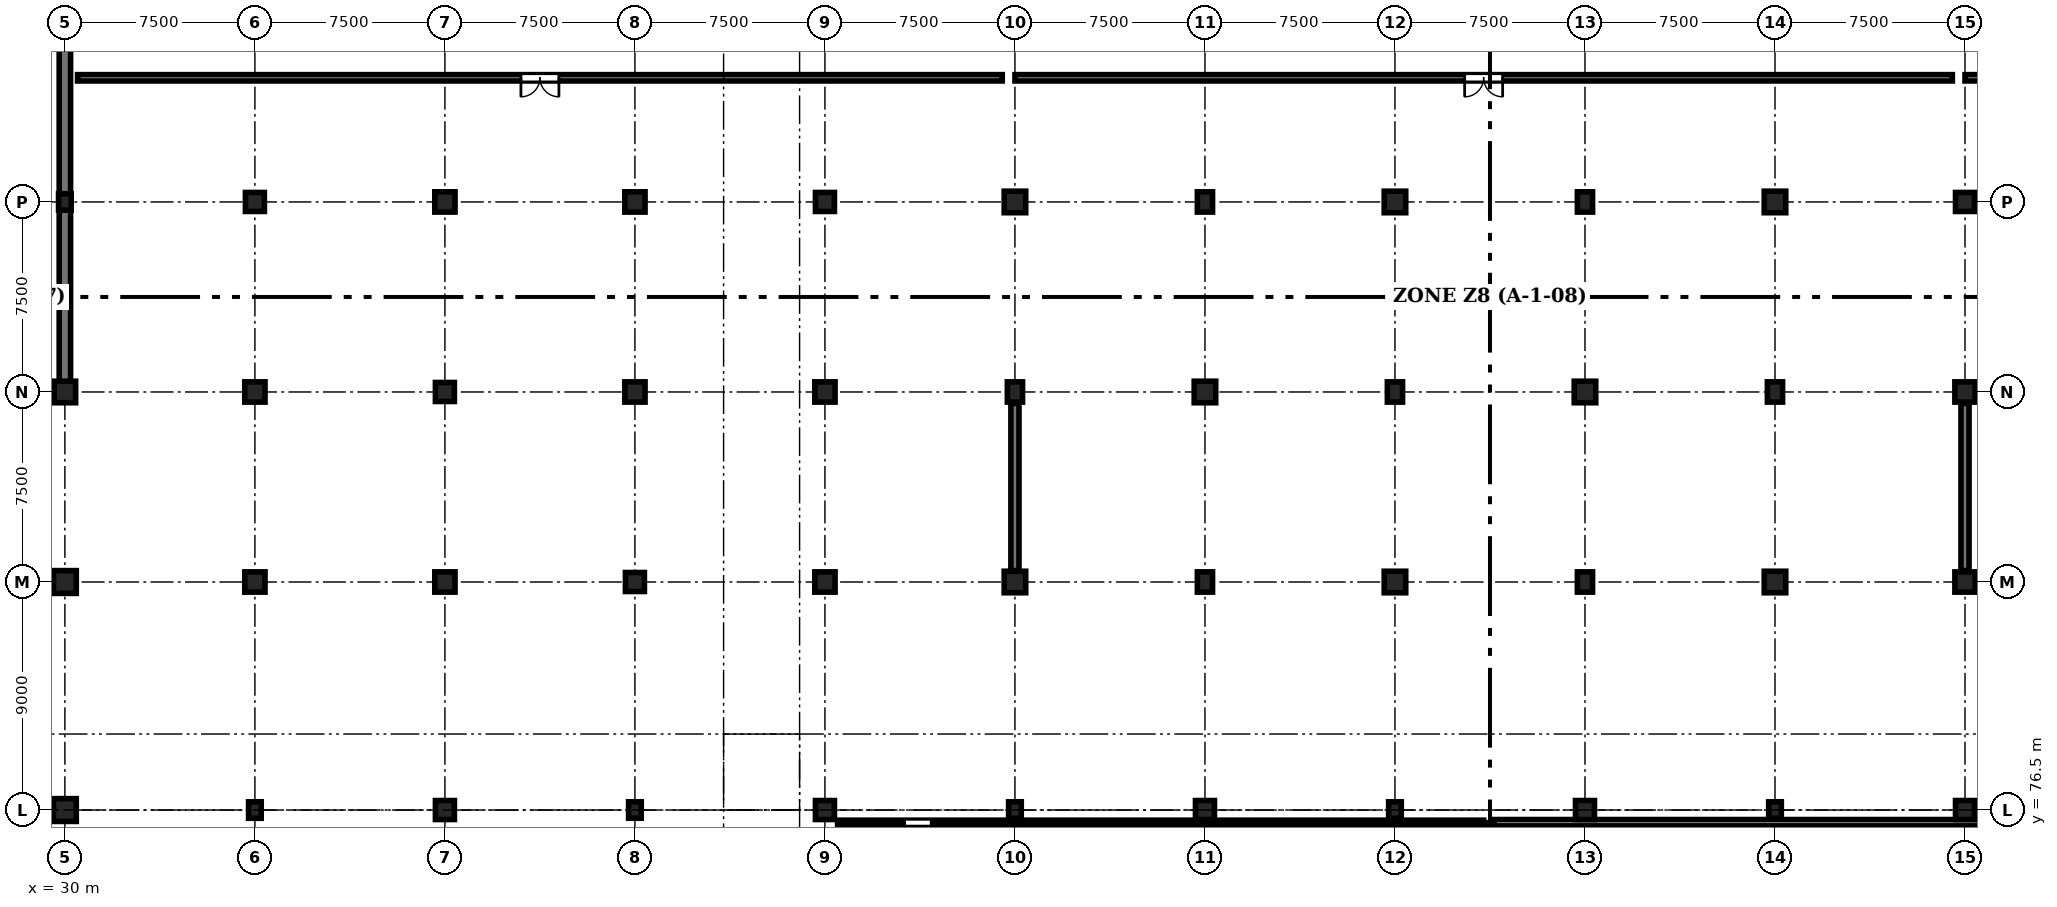
"""IFC4 building model, lengths in metres.
Left out: names, types, materials, properties, quantities, classifications, styles, units other than length and angle.
Written with IfcOpenShell. Run it as: python <this file> out.ifc"""

import sys

from ifc_helpers import new_model, si_unit, direction, frame, frame_2d, origin, origin_2d, place, context, subcontext, project, spatial, rectangle, circle, extrude, element, fill, save


model = new_model("IFC4")
c1 = context("Model", 3, precision=1e-05, world=origin(), true_north=direction((0.0, 1.0)))
c2 = subcontext(c1, "Body", "Model", "MODEL_VIEW")
j1 = project(units=[si_unit("LENGTHUNIT", "METRE"), si_unit("PLANEANGLEUNIT", "RADIAN")], contexts=[c1])
p1 = place(None, origin())
s1 = spatial("IfcSite", under=j1, at=p1, CompositionType="ELEMENT")
p2 = place(p1, origin())
s2 = spatial("IfcBuilding", under=s1, at=p2, CompositionType="ELEMENT")
p3 = place(p2, frame((0.0, 0.0, -4.5)))
s3 = spatial("IfcBuildingStorey", under=s2, at=p3, CompositionType="ELEMENT", Elevation=-4.5)
p4 = place(p3, frame((30.0, 76.5, 0.0), z_axis=(0.0, 0.0, 1.0), x_axis=(1.0, 0.0, 0.0)))
e1 = element("IfcColumn", 1, at=p4, inside=s3, PredefinedType="COLUMN", context=c2, shape_type="SweptSolid", body=[
    extrude(rectangle(XDim=0.9, YDim=0.9, at=origin_2d()), origin(), (0.0, 0.0, 1.0), 4.5),
])
p5 = place(p3, frame((30.0, 85.5, 0.0), z_axis=(0.0, 0.0, 1.0), x_axis=(1.0, 0.0, 0.0)))
e2 = element("IfcColumn", 2, at=p5, inside=s3, PredefinedType="COLUMN", context=c2, shape_type="SweptSolid", body=[
    extrude(circle(Radius=0.45, at=origin_2d()), origin(), (0.0, 0.0, 1.0), 4.5),
])
p6 = place(p3, frame((30.0, 93.0, 0.0), z_axis=(0.0, 0.0, 1.0), x_axis=(1.0, 0.0, 0.0)))
e3 = element("IfcColumn", 3, at=p6, inside=s3, PredefinedType="COLUMN", context=c2, shape_type="SweptSolid", body=[
    extrude(rectangle(XDim=0.85, YDim=0.85, at=origin_2d()), origin(), (0.0, 0.0, 1.0), 4.5),
])
for number, where, z_axis, x_axis in (
    (4, (30.0, 100.5, 0.0), (0.0, 0.0, 1.0), (1.0, 0.0, 0.0)),
    (5, (37.5, 76.5, 0.0), (0.0, 0.0, 1.0), (1.0, 0.0, 0.0)),
):
    element("IfcColumn", number, at=place(p3, frame(where, z_axis=z_axis, x_axis=x_axis)), inside=s3, PredefinedType="COLUMN", context=c2, shape_type="SweptSolid", body=[
        extrude(rectangle(XDim=0.5, YDim=0.65, at=origin_2d()), origin(), (0.0, 0.0, 1.0), 4.5),
    ])
for number, where, z_axis, x_axis in (
    (6, (37.5, 85.5, 0.0), (0.0, 0.0, 1.0), (1.0, 0.0, 0.0)),
    (7, (37.5, 93.0, 0.0), (0.0, 0.0, 1.0), (1.0, 0.0, 0.0)),
):
    element("IfcColumn", number, at=place(p3, frame(where, z_axis=z_axis, x_axis=x_axis)), inside=s3, PredefinedType="COLUMN", context=c2, shape_type="SweptSolid", body=[
        extrude(rectangle(XDim=0.8, YDim=0.8, at=origin_2d()), origin(), (0.0, 0.0, 1.0), 4.5),
    ])
p7 = place(p3, frame((37.5, 100.5, 0.0), z_axis=(0.0, 0.0, 1.0), x_axis=(1.0, 0.0, 0.0)))
e8 = element("IfcColumn", 8, at=p7, inside=s3, PredefinedType="COLUMN", context=c2, shape_type="SweptSolid", body=[
    extrude(circle(Radius=0.375, at=origin_2d()), origin(), (0.0, 0.0, 1.0), 4.5),
])
p8 = place(p3, frame((45.0, 76.5, 0.0), z_axis=(0.0, 0.0, 1.0), x_axis=(1.0, 0.0, 0.0)))
e9 = element("IfcColumn", 9, at=p8, inside=s3, PredefinedType="COLUMN", context=c2, shape_type="SweptSolid", body=[
    extrude(rectangle(XDim=0.75, YDim=0.75, at=origin_2d()), origin(), (0.0, 0.0, 1.0), 4.5),
])
p9 = place(p3, frame((45.0, 85.5, 0.0), z_axis=(0.0, 0.0, 1.0), x_axis=(1.0, 0.0, 0.0)))
e10 = element("IfcColumn", 10, at=p9, inside=s3, PredefinedType="COLUMN", context=c2, shape_type="SweptSolid", body=[
    extrude(rectangle(XDim=0.8, YDim=0.8, at=origin_2d()), origin(), (0.0, 0.0, 1.0), 4.5),
])
p10 = place(p3, frame((45.0, 93.0, 0.0), z_axis=(0.0, 0.0, 1.0), x_axis=(1.0, 0.0, 0.0)))
e11 = element("IfcColumn", 11, at=p10, inside=s3, PredefinedType="COLUMN", context=c2, shape_type="SweptSolid", body=[
    extrude(circle(Radius=0.375, at=origin_2d()), origin(), (0.0, 0.0, 1.0), 4.5),
])
p11 = place(p3, frame((45.0, 100.5, 0.0), z_axis=(0.0, 0.0, 1.0), x_axis=(1.0, 0.0, 0.0)))
e12 = element("IfcColumn", 12, at=p11, inside=s3, PredefinedType="COLUMN", context=c2, shape_type="SweptSolid", body=[
    extrude(rectangle(XDim=0.8, YDim=0.8, at=origin_2d()), origin(), (0.0, 0.0, 1.0), 4.5),
])
p12 = place(p3, frame((52.5, 76.5, 0.0), z_axis=(0.0, 0.0, 1.0), x_axis=(1.0, 0.0, 0.0)))
e13 = element("IfcColumn", 13, at=p12, inside=s3, PredefinedType="COLUMN", context=c2, shape_type="SweptSolid", body=[
    extrude(rectangle(XDim=0.5, YDim=0.65, at=origin_2d()), origin(), (0.0, 0.0, 1.0), 4.5),
])
p13 = place(p3, frame((52.5, 85.5, 0.0), z_axis=(0.0, 0.0, 1.0), x_axis=(1.0, 0.0, 0.0)))
e14 = element("IfcColumn", 14, at=p13, inside=s3, PredefinedType="COLUMN", context=c2, shape_type="SweptSolid", body=[
    extrude(circle(Radius=0.375, at=origin_2d()), origin(), (0.0, 0.0, 1.0), 4.5),
])
for number, where, z_axis, x_axis in (
    (15, (52.5, 93.0, 0.0), (0.0, 0.0, 1.0), (1.0, 0.0, 0.0)),
    (16, (52.5, 100.5, 0.0), (0.0, 0.0, 1.0), (1.0, 0.0, 0.0)),
):
    element("IfcColumn", number, at=place(p3, frame(where, z_axis=z_axis, x_axis=x_axis)), inside=s3, PredefinedType="COLUMN", context=c2, shape_type="SweptSolid", body=[
        extrude(rectangle(XDim=0.8, YDim=0.8, at=origin_2d()), origin(), (0.0, 0.0, 1.0), 4.5),
    ])
p14 = place(p3, frame((60.0, 76.5, 0.0), z_axis=(0.0, 0.0, 1.0), x_axis=(1.0, 0.0, 0.0)))
e17 = element("IfcColumn", 17, at=p14, inside=s3, PredefinedType="COLUMN", context=c2, shape_type="SweptSolid", body=[
    extrude(rectangle(XDim=0.75, YDim=0.75, at=origin_2d()), origin(), (0.0, 0.0, 1.0), 4.5),
])
for number, where, z_axis, x_axis in (
    (18, (60.0, 85.5, 0.0), (0.0, 0.0, 1.0), (1.0, 0.0, 0.0)),
    (19, (60.0, 93.0, 0.0), (0.0, 0.0, 1.0), (1.0, 0.0, 0.0)),
):
    element("IfcColumn", number, at=place(p3, frame(where, z_axis=z_axis, x_axis=x_axis)), inside=s3, PredefinedType="COLUMN", context=c2, shape_type="SweptSolid", body=[
        extrude(rectangle(XDim=0.8, YDim=0.8, at=origin_2d()), origin(), (0.0, 0.0, 1.0), 4.5),
    ])
p15 = place(p3, frame((60.0, 100.5, 0.0), z_axis=(0.0, 0.0, 1.0), x_axis=(1.0, 0.0, 0.0)))
e20 = element("IfcColumn", 20, at=p15, inside=s3, PredefinedType="COLUMN", context=c2, shape_type="SweptSolid", body=[
    extrude(circle(Radius=0.375, at=origin_2d()), origin(), (0.0, 0.0, 1.0), 4.5),
])
p16 = place(p3, frame((67.5, 76.5, 0.0), z_axis=(0.0, 0.0, 1.0), x_axis=(1.0, 0.0, 0.0)))
e21 = element("IfcColumn", 21, at=p16, inside=s3, PredefinedType="COLUMN", context=c2, shape_type="SweptSolid", body=[
    extrude(rectangle(XDim=0.5, YDim=0.65, at=origin_2d()), origin(), (0.0, 0.0, 1.0), 4.5),
])
p17 = place(p3, frame((67.5, 85.5, 0.0), z_axis=(0.0, 0.0, 1.0), x_axis=(1.0, 0.0, 0.0)))
e22 = element("IfcColumn", 22, at=p17, inside=s3, PredefinedType="COLUMN", context=c2, shape_type="SweptSolid", body=[
    extrude(rectangle(XDim=0.85, YDim=0.85, at=origin_2d()), origin(), (0.0, 0.0, 1.0), 4.5),
])
p18 = place(p3, frame((67.5, 93.0, 0.0), z_axis=(0.0, 0.0, 1.0), x_axis=(1.0, 0.0, 0.0)))
e23 = element("IfcColumn", 23, at=p18, inside=s3, PredefinedType="COLUMN", context=c2, shape_type="SweptSolid", body=[
    extrude(rectangle(XDim=0.6, YDim=0.8, at=origin_2d()), origin(), (0.0, 0.0, 1.0), 4.5),
])
p19 = place(p3, frame((67.5, 100.5, 0.0), z_axis=(0.0, 0.0, 1.0), x_axis=(1.0, 0.0, 0.0)))
e24 = element("IfcColumn", 24, at=p19, inside=s3, PredefinedType="COLUMN", context=c2, shape_type="SweptSolid", body=[
    extrude(rectangle(XDim=0.85, YDim=0.85, at=origin_2d()), origin(), (0.0, 0.0, 1.0), 4.5),
])
p20 = place(p3, frame((75.0, 76.5, 0.0), z_axis=(0.0, 0.0, 1.0), x_axis=(1.0, 0.0, 0.0)))
e25 = element("IfcColumn", 25, at=p20, inside=s3, PredefinedType="COLUMN", context=c2, shape_type="SweptSolid", body=[
    extrude(rectangle(XDim=0.75, YDim=0.75, at=origin_2d()), origin(), (0.0, 0.0, 1.0), 4.5),
])
p21 = place(p3, frame((75.0, 85.5, 0.0), z_axis=(0.0, 0.0, 1.0), x_axis=(1.0, 0.0, 0.0)))
e26 = element("IfcColumn", 26, at=p21, inside=s3, PredefinedType="COLUMN", context=c2, shape_type="SweptSolid", body=[
    extrude(rectangle(XDim=0.6, YDim=0.8, at=origin_2d()), origin(), (0.0, 0.0, 1.0), 4.5),
])
p22 = place(p3, frame((75.0, 93.0, 0.0), z_axis=(0.0, 0.0, 1.0), x_axis=(1.0, 0.0, 0.0)))
e27 = element("IfcColumn", 27, at=p22, inside=s3, PredefinedType="COLUMN", context=c2, shape_type="SweptSolid", body=[
    extrude(rectangle(XDim=0.85, YDim=0.85, at=origin_2d()), origin(), (0.0, 0.0, 1.0), 4.5),
])
p23 = place(p3, frame((75.0, 100.5, 0.0), z_axis=(0.0, 0.0, 1.0), x_axis=(1.0, 0.0, 0.0)))
e28 = element("IfcColumn", 28, at=p23, inside=s3, PredefinedType="COLUMN", context=c2, shape_type="SweptSolid", body=[
    extrude(rectangle(XDim=0.6, YDim=0.8, at=origin_2d()), origin(), (0.0, 0.0, 1.0), 4.5),
])
p24 = place(p3, frame((82.5, 76.5, 0.0), z_axis=(0.0, 0.0, 1.0), x_axis=(1.0, 0.0, 0.0)))
e29 = element("IfcColumn", 29, at=p24, inside=s3, PredefinedType="COLUMN", context=c2, shape_type="SweptSolid", body=[
    extrude(rectangle(XDim=0.5, YDim=0.65, at=origin_2d()), origin(), (0.0, 0.0, 1.0), 4.5),
])
p25 = place(p3, frame((82.5, 85.5, 0.0), z_axis=(0.0, 0.0, 1.0), x_axis=(1.0, 0.0, 0.0)))
e30 = element("IfcColumn", 30, at=p25, inside=s3, PredefinedType="COLUMN", context=c2, shape_type="SweptSolid", body=[
    extrude(rectangle(XDim=0.85, YDim=0.85, at=origin_2d()), origin(), (0.0, 0.0, 1.0), 4.5),
])
p26 = place(p3, frame((82.5, 93.0, 0.0), z_axis=(0.0, 0.0, 1.0), x_axis=(1.0, 0.0, 0.0)))
e31 = element("IfcColumn", 31, at=p26, inside=s3, PredefinedType="COLUMN", context=c2, shape_type="SweptSolid", body=[
    extrude(rectangle(XDim=0.6, YDim=0.8, at=origin_2d()), origin(), (0.0, 0.0, 1.0), 4.5),
])
p27 = place(p3, frame((82.5, 100.5, 0.0), z_axis=(0.0, 0.0, 1.0), x_axis=(1.0, 0.0, 0.0)))
e32 = element("IfcColumn", 32, at=p27, inside=s3, PredefinedType="COLUMN", context=c2, shape_type="SweptSolid", body=[
    extrude(rectangle(XDim=0.85, YDim=0.85, at=origin_2d()), origin(), (0.0, 0.0, 1.0), 4.5),
])
p28 = place(p3, frame((90.0, 76.5, 0.0), z_axis=(0.0, 0.0, 1.0), x_axis=(1.0, 0.0, 0.0)))
e33 = element("IfcColumn", 33, at=p28, inside=s3, PredefinedType="COLUMN", context=c2, shape_type="SweptSolid", body=[
    extrude(rectangle(XDim=0.75, YDim=0.75, at=origin_2d()), origin(), (0.0, 0.0, 1.0), 4.5),
])
p29 = place(p3, frame((90.0, 85.5, 0.0), z_axis=(0.0, 0.0, 1.0), x_axis=(1.0, 0.0, 0.0)))
e34 = element("IfcColumn", 34, at=p29, inside=s3, PredefinedType="COLUMN", context=c2, shape_type="SweptSolid", body=[
    extrude(rectangle(XDim=0.6, YDim=0.8, at=origin_2d()), origin(), (0.0, 0.0, 1.0), 4.5),
])
p30 = place(p3, frame((90.0, 93.0, 0.0), z_axis=(0.0, 0.0, 1.0), x_axis=(1.0, 0.0, 0.0)))
e35 = element("IfcColumn", 35, at=p30, inside=s3, PredefinedType="COLUMN", context=c2, shape_type="SweptSolid", body=[
    extrude(rectangle(XDim=0.85, YDim=0.85, at=origin_2d()), origin(), (0.0, 0.0, 1.0), 4.5),
])
p31 = place(p3, frame((90.0, 100.5, 0.0), z_axis=(0.0, 0.0, 1.0), x_axis=(1.0, 0.0, 0.0)))
e36 = element("IfcColumn", 36, at=p31, inside=s3, PredefinedType="COLUMN", context=c2, shape_type="SweptSolid", body=[
    extrude(rectangle(XDim=0.6, YDim=0.8, at=origin_2d()), origin(), (0.0, 0.0, 1.0), 4.5),
])
p32 = place(p3, frame((97.5, 76.5, 0.0), z_axis=(0.0, 0.0, 1.0), x_axis=(1.0, 0.0, 0.0)))
e37 = element("IfcColumn", 37, at=p32, inside=s3, PredefinedType="COLUMN", context=c2, shape_type="SweptSolid", body=[
    extrude(rectangle(XDim=0.5, YDim=0.65, at=origin_2d()), origin(), (0.0, 0.0, 1.0), 4.5),
])
p33 = place(p3, frame((97.5, 85.5, 0.0), z_axis=(0.0, 0.0, 1.0), x_axis=(1.0, 0.0, 0.0)))
e38 = element("IfcColumn", 38, at=p33, inside=s3, PredefinedType="COLUMN", context=c2, shape_type="SweptSolid", body=[
    extrude(rectangle(XDim=0.85, YDim=0.85, at=origin_2d()), origin(), (0.0, 0.0, 1.0), 4.5),
])
p34 = place(p3, frame((97.5, 93.0, 0.0), z_axis=(0.0, 0.0, 1.0), x_axis=(1.0, 0.0, 0.0)))
e39 = element("IfcColumn", 39, at=p34, inside=s3, PredefinedType="COLUMN", context=c2, shape_type="SweptSolid", body=[
    extrude(rectangle(XDim=0.6, YDim=0.8, at=origin_2d()), origin(), (0.0, 0.0, 1.0), 4.5),
])
p35 = place(p3, frame((97.5, 100.5, 0.0), z_axis=(0.0, 0.0, 1.0), x_axis=(1.0, 0.0, 0.0)))
e40 = element("IfcColumn", 40, at=p35, inside=s3, PredefinedType="COLUMN", context=c2, shape_type="SweptSolid", body=[
    extrude(rectangle(XDim=0.85, YDim=0.85, at=origin_2d()), origin(), (0.0, 0.0, 1.0), 4.5),
])
p36 = place(p3, frame((105.0, 76.5, 0.0), z_axis=(0.0, 0.0, 1.0), x_axis=(1.0, 0.0, 0.0)))
e41 = element("IfcColumn", 41, at=p36, inside=s3, PredefinedType="COLUMN", context=c2, shape_type="SweptSolid", body=[
    extrude(rectangle(XDim=0.75, YDim=0.75, at=origin_2d()), origin(), (0.0, 0.0, 1.0), 4.5),
])
for number, where, z_axis, x_axis in (
    (42, (105.0, 85.5, 0.0), (0.0, 0.0, 1.0), (1.0, 0.0, 0.0)),
    (43, (105.0, 93.0, 0.0), (0.0, 0.0, 1.0), (1.0, 0.0, 0.0)),
):
    element("IfcColumn", number, at=place(p3, frame(where, z_axis=z_axis, x_axis=x_axis)), inside=s3, PredefinedType="COLUMN", context=c2, shape_type="SweptSolid", body=[
        extrude(rectangle(XDim=0.8, YDim=0.8, at=origin_2d()), origin(), (0.0, 0.0, 1.0), 4.5),
    ])
p37 = place(p3, frame((105.0, 100.5, 0.0), z_axis=(0.0, 0.0, 1.0), x_axis=(1.0, 0.0, 0.0)))
e44 = element("IfcColumn", 44, at=p37, inside=s3, PredefinedType="COLUMN", context=c2, shape_type="SweptSolid", body=[
    extrude(circle(Radius=0.375, at=origin_2d()), origin(), (0.0, 0.0, 1.0), 4.5),
])
for number, where, z_axis, x_axis in (
    (45, (22.5, 93.0, 0.0), (0.0, 0.0, 1.0), (1.0, 0.0, 0.0)),
    (46, (30.0, 93.0, 0.0), (0.0, 0.0, 1.0), (0.0, 1.0, 0.0)),
):
    element("IfcWall", number, at=place(p3, frame(where, z_axis=z_axis, x_axis=x_axis)), inside=s3, PredefinedType="SOLIDWALL", context=c2, shape_type="SweptSolid", body=[
        extrude(rectangle(XDim=7.5, YDim=0.45, at=frame_2d((3.75, 0.0))), origin(), (0.0, 0.0, 1.0), 4.14),
    ])
p38 = place(p3, frame((30.0, 100.5, 0.0), z_axis=(0.0, 0.0, 1.0), x_axis=(0.0, 1.0, 0.0)))
e47 = element("IfcWall", 47, at=p38, inside=s3, PredefinedType="SOLIDWALL", context=c2, shape_type="SweptSolid", body=[
    extrude(rectangle(XDim=9.0, YDim=0.45, at=frame_2d((4.5, 0.0))), origin(), (0.0, 0.0, 1.0), 4.14),
])
for number, where, z_axis, x_axis in (
    (48, (67.5, 85.95, 0.0), (0.0, 0.0, 1.0), (0.0, 1.0, 0.0)),
    (49, (105.0, 85.95, 0.0), (0.0, 0.0, 1.0), (0.0, 1.0, 0.0)),
):
    element("IfcWall", number, at=place(p3, frame(where, z_axis=z_axis, x_axis=x_axis)), inside=s3, PredefinedType="SHEAR", context=c2, shape_type="SweptSolid", body=[
        extrude(rectangle(XDim=6.6, YDim=0.32, at=frame_2d((3.3, 0.0))), origin(), (0.0, 0.0, 1.0), 3.59),
    ])
p39 = place(p3, frame((86.0, 76.0, 0.0), z_axis=(0.0, 0.0, 1.0), x_axis=(-1.0, 0.0, 0.0)))
e50 = element("IfcWall", 50, at=p39, inside=s3, PredefinedType="STANDARD", context=c2, shape_type="SweptSolid", body=[
    extrude(rectangle(XDim=25.5, YDim=0.2, at=frame_2d((12.75, 0.0))), origin(), (0.0, 0.0, 1.0), 4.125),
])
p40 = place(p39, frame((21.805, 0.0, 0.0)))
e51 = element("IfcOpeningElement", 51, at=p40, cuts=e50, PredefinedType="OPENING", context=c2, shape_type="SweptSolid", body=[
    extrude(rectangle(XDim=1.05, YDim=2.2, at=frame_2d((0.525, 1.1))), frame((0.0, 0.11, 0.0), z_axis=(0.0, -1.0, 0.0), x_axis=(1.0, 0.0, 0.0)), (0.0, 0.0, 1.0), 0.22),
])
p41 = place(p3, frame((112.0, 76.0, 0.0), z_axis=(0.0, 0.0, 1.0), x_axis=(-1.0, 0.0, 0.0)))
e52 = element("IfcWall", 52, at=p41, inside=s3, PredefinedType="STANDARD", context=c2, shape_type="SweptSolid", body=[
    extrude(rectangle(XDim=25.6, YDim=0.25, at=frame_2d((12.8, 0.0))), origin(), (0.0, 0.0, 1.0), 4.125),
])
p42 = place(p41, frame((2.61, 0.0, 0.0)))
e53 = element("IfcOpeningElement", 53, at=p42, cuts=e52, PredefinedType="OPENING", context=c2, shape_type="SweptSolid", body=[
    extrude(rectangle(XDim=1.5, YDim=2.3, at=frame_2d((0.75, 1.15))), frame((0.0, 0.135, 0.0), z_axis=(0.0, -1.0, 0.0), x_axis=(1.0, 0.0, 0.0)), (0.0, 0.0, 1.0), 0.27),
])
p43 = place(p3, frame((67.0, 105.4, 0.0), z_axis=(0.0, 0.0, 1.0), x_axis=(-1.0, 0.0, 0.0)))
e54 = element("IfcWall", 54, at=p43, inside=s3, PredefinedType="STANDARD", context=c2, shape_type="SweptSolid", body=[
    extrude(rectangle(XDim=36.5, YDim=0.25, at=frame_2d((18.25, 0.0))), origin(), (0.0, 0.0, 1.0), 4.125),
])
p44 = place(p43, frame((17.5, 0.0, 0.0)))
e55 = element("IfcOpeningElement", 55, at=p44, cuts=e54, PredefinedType="OPENING", context=c2, shape_type="SweptSolid", body=[
    extrude(rectangle(XDim=1.5, YDim=2.3, at=frame_2d((0.75, 1.15))), frame((0.0, 0.135, 0.0), z_axis=(0.0, -1.0, 0.0), x_axis=(1.0, 0.0, 0.0)), (0.0, 0.0, 1.0), 0.27),
])
p45 = place(p3, frame((104.5, 105.4, 0.0), z_axis=(0.0, 0.0, 1.0), x_axis=(-1.0, 0.0, 0.0)))
e56 = element("IfcWall", 56, at=p45, inside=s3, PredefinedType="STANDARD", context=c2, shape_type="SweptSolid", body=[
    extrude(rectangle(XDim=37.0, YDim=0.25, at=frame_2d((18.5, 0.0))), origin(), (0.0, 0.0, 1.0), 4.125),
])
p46 = place(p45, frame((17.75, 0.0, 0.0)))
e57 = element("IfcOpeningElement", 57, at=p46, cuts=e56, PredefinedType="OPENING", context=c2, shape_type="SweptSolid", body=[
    extrude(rectangle(XDim=1.5, YDim=2.3, at=frame_2d((0.75, 1.15))), frame((0.0, 0.135, 0.0), z_axis=(0.0, -1.0, 0.0), x_axis=(1.0, 0.0, 0.0)), (0.0, 0.0, 1.0), 0.27),
])
p47 = place(p3, frame((142.0, 105.4, 0.0), z_axis=(0.0, 0.0, 1.0), x_axis=(-1.0, 0.0, 0.0)))
e58 = element("IfcWall", 58, at=p47, inside=s3, PredefinedType="STANDARD", context=c2, shape_type="SweptSolid", body=[
    extrude(rectangle(XDim=37.0, YDim=0.25, at=frame_2d((18.5, 0.0))), origin(), (0.0, 0.0, 1.0), 4.125),
])
p48 = place(p47, frame((17.75, 0.0, 0.0)))
e59 = element("IfcOpeningElement", 59, at=p48, cuts=e58, PredefinedType="OPENING", context=c2, shape_type="SweptSolid", body=[
    extrude(rectangle(XDim=1.5, YDim=2.3, at=frame_2d((0.75, 1.15))), frame((0.0, 0.135, 0.0), z_axis=(0.0, -1.0, 0.0), x_axis=(1.0, 0.0, 0.0)), (0.0, 0.0, 1.0), 0.27),
])
p49 = place(p3, frame((86.0, 54.2, 0.0), z_axis=(0.0, 0.0, 1.0), x_axis=(0.0, 1.0, 0.0)))
e60 = element("IfcWall", 60, at=p49, inside=s3, PredefinedType="PARTITIONING", context=c2, shape_type="SweptSolid", body=[
    extrude(rectangle(XDim=21.8, YDim=0.15, at=frame_2d((10.9, 0.0))), origin(), (0.0, 0.0, 1.0), 3.725),
])
p50 = place(p40, origin())
e61 = element("IfcDoor", 61, at=p50, inside=s3, OperationType="SINGLE_SWING_RIGHT", PredefinedType="DOOR", context=c2, shape_type="SweptSolid", body=[
    extrude(rectangle(XDim=1.05, YDim=2.2, at=frame_2d((0.525, 1.1))), frame((0.0, 0.025, 0.0), z_axis=(0.0, -1.0, 0.0), x_axis=(1.0, 0.0, 0.0)), (0.0, 0.0, 1.0), 0.05),
])
fill(e51, e61)
p51 = place(p44, origin())
e62 = element("IfcDoor", 62, at=p51, inside=s3, OperationType="DOUBLE_DOOR_SINGLE_SWING", PredefinedType="DOOR", context=c2, shape_type="SweptSolid", body=[
    extrude(rectangle(XDim=1.5, YDim=2.3, at=frame_2d((0.75, 1.15))), frame((0.0, 0.025, 0.0), z_axis=(0.0, -1.0, 0.0), x_axis=(1.0, 0.0, 0.0)), (0.0, 0.0, 1.0), 0.05),
])
fill(e55, e62)
p52 = place(p46, origin())
e63 = element("IfcDoor", 63, at=p52, inside=s3, OperationType="DOUBLE_DOOR_SINGLE_SWING", PredefinedType="DOOR", context=c2, shape_type="SweptSolid", body=[
    extrude(rectangle(XDim=1.5, YDim=2.3, at=frame_2d((0.75, 1.15))), frame((0.0, 0.025, 0.0), z_axis=(0.0, -1.0, 0.0), x_axis=(1.0, 0.0, 0.0)), (0.0, 0.0, 1.0), 0.05),
])
fill(e57, e63)
save(model, sys.argv[1])
